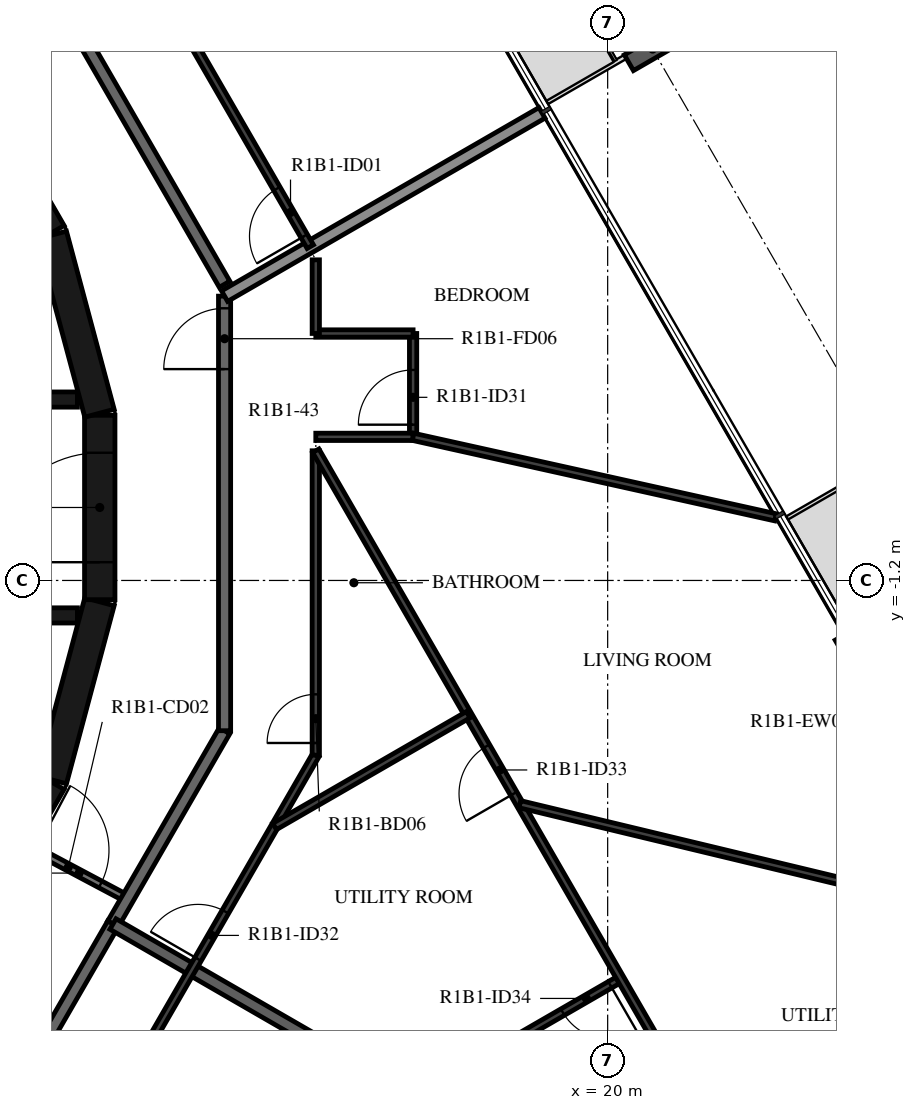
"""IFC4 building model, lengths in metres.
Left out: names, types, materials, properties, quantities, classifications, styles, units other than length and angle.
Written with IfcOpenShell. Run it as: python <this file> out.ifc"""

import sys

from ifc_helpers import new_model, si_unit, direction, frame, frame_2d, origin, origin_2d, place, context, subcontext, project, spatial, rectangle, i_section, extrude, element, fill, save


model = new_model("IFC4")
c1 = context("Model", 3, precision=1e-05, world=origin(), true_north=direction((0.0, 1.0)))
c2 = subcontext(c1, "Body", "Model", "MODEL_VIEW")
j1 = project(units=[si_unit("LENGTHUNIT", "METRE"), si_unit("PLANEANGLEUNIT", "RADIAN")], contexts=[c1])
p1 = place(None, origin())
s1 = spatial("IfcSite", under=j1, at=p1, CompositionType="ELEMENT")
p2 = place(p1, origin())
s2 = spatial("IfcBuilding", under=s1, at=p2, CompositionType="ELEMENT")
p3 = place(p2, frame((0.0, 0.0, 48.9)))
s3 = spatial("IfcBuildingStorey", under=s2, at=p3, CompositionType="ELEMENT", Elevation=48.9)
p4 = place(p3, frame((20.739, 7.539, -0.38), z_axis=(0.0, 0.0, 1.0), x_axis=(0.50000017485, -0.866025302835, 0.0)))
e1 = element("IfcColumn", 1, at=p4, inside=s3, PredefinedType="COLUMN", context=c2, shape_type="SweptSolid", body=[
    extrude(i_section(OverallWidth=0.3, OverallDepth=0.9, WebThickness=0.019, FlangeThickness=0.035, FilletRadius=0.03, at=origin_2d()), origin(), (0.0, 0.0, 1.0), 3.5),
])
p5 = place(p3, frame((25.411, -4.913, 0.0), z_axis=(0.0, 0.0, 1.0), x_axis=(-0.500028443584, 0.866008981251, 0.0)))
e2 = element("IfcWall", 2, at=p5, inside=s3, PredefinedType="STANDARD", context=c2, shape_type="SweptSolid", body=[
    extrude(rectangle(XDim=3.2, YDim=0.16, at=frame_2d((1.6, 0.0))), origin(), (0.0, 0.0, 1.0), 3.12),
])
p6 = place(p5, frame((0.4, 0.0, 0.0)))
e3 = element("IfcOpeningElement", 3, at=p6, cuts=e2, PredefinedType="OPENING", context=c2, shape_type="SweptSolid", body=[
    extrude(rectangle(XDim=2.4, YDim=2.4, at=frame_2d((1.2, 1.2))), frame((0.0, 0.09, 0.0), z_axis=(0.0, -1.0, 0.0), x_axis=(1.0, 0.0, 0.0)), (0.0, 0.0, 1.0), 0.18),
])
for number, where, z_axis, x_axis in (
    (4, (9.329, -7.137, 0.0), (0.0, 0.0, 1.0), (0.5, 0.866, 0.0)),
    (5, (10.858, -4.479, 0.0), (0.0, 0.0, 1.0), (0.259, 0.966, 0.0)),
):
    element("IfcWall", number, at=place(p3, frame(where, z_axis=z_axis, x_axis=x_axis)), inside=s3, PredefinedType="SHEAR", context=c2, shape_type="SweptSolid", body=[
        extrude(rectangle(XDim=3.033, YDim=0.5, at=frame_2d((1.516, 0.0))), origin(), (0.0, 0.0, 1.0), 3.12),
    ])
p7 = place(p3, frame((11.647, -1.516, 0.0), z_axis=(0.0, 0.0, 1.0), x_axis=(0.0, 1.0, 0.0)))
e6 = element("IfcWall", 6, at=p7, inside=s3, PredefinedType="SHEAR", context=c2, shape_type="SweptSolid", body=[
    extrude(rectangle(XDim=3.033, YDim=0.5, at=frame_2d((1.516, 0.0))), origin(), (0.0, 0.0, 1.0), 3.12),
])
p8 = place(p7, frame((0.616, 0.0, 0.0)))
e7 = element("IfcOpeningElement", 7, at=p8, cuts=e6, PredefinedType="OPENING", context=c2, shape_type="SweptSolid", body=[
    extrude(rectangle(XDim=1.8, YDim=2.1, at=frame_2d((0.9, 1.05))), frame((0.0, 0.26, 0.0), z_axis=(0.0, -1.0, 0.0), x_axis=(1.0, 0.0, 0.0)), (0.0, 0.0, 1.0), 0.52),
])
for number, where, z_axis, x_axis in (
    (8, (11.643, 1.55, 0.0), (0.0, 0.0, 1.0), (-0.259, 0.966, 0.0)),
    (9, (10.845, 4.51, 0.0), (0.0, 0.0, 1.0), (-0.5, 0.866, 0.0)),
):
    element("IfcWall", number, at=place(p3, frame(where, z_axis=z_axis, x_axis=x_axis)), inside=s3, PredefinedType="SHEAR", context=c2, shape_type="SweptSolid", body=[
        extrude(rectangle(XDim=3.033, YDim=0.5, at=frame_2d((1.516, 0.0))), origin(), (0.0, 0.0, 1.0), 3.12),
    ])
p9 = place(p3, frame((3.35, 1.775, 0.0), z_axis=(0.0, 0.0, 1.0), x_axis=(1.0, 0.0, 0.0)))
e10 = element("IfcWall", 10, at=p9, inside=s3, PredefinedType="SHEAR", context=c2, shape_type="SweptSolid", body=[
    extrude(rectangle(XDim=7.93, YDim=0.25, at=frame_2d((3.965, 0.0))), origin(), (0.0, 0.0, 1.0), 3.12),
])
p10 = place(p9, frame((0.35, 0.0, 0.0)))
e11 = element("IfcOpeningElement", 11, at=p10, cuts=e10, PredefinedType="OPENING", context=c2, shape_type="SweptSolid", body=[
    extrude(rectangle(XDim=1.2, YDim=2.4, at=frame_2d((0.6, 1.2))), frame((0.0, 0.135, 0.0), z_axis=(0.0, -1.0, 0.0), x_axis=(1.0, 0.0, 0.0)), (0.0, 0.0, 1.0), 0.27),
])
p11 = place(p9, frame((2.5, 0.0, 0.0)))
e12 = element("IfcOpeningElement", 12, at=p11, cuts=e10, PredefinedType="OPENING", context=c2, shape_type="SweptSolid", body=[
    extrude(rectangle(XDim=1.2, YDim=2.4, at=frame_2d((0.6, 1.2))), frame((0.0, 0.135, 0.0), z_axis=(0.0, -1.0, 0.0), x_axis=(1.0, 0.0, 0.0)), (0.0, 0.0, 1.0), 0.27),
])
p12 = place(p9, frame((4.8, 0.0, 0.0)))
e13 = element("IfcOpeningElement", 13, at=p12, cuts=e10, PredefinedType="OPENING", context=c2, shape_type="SweptSolid", body=[
    extrude(rectangle(XDim=0.9, YDim=2.1, at=frame_2d((0.45, 1.05))), frame((0.0, 0.135, 0.0), z_axis=(0.0, -1.0, 0.0), x_axis=(1.0, 0.0, 0.0)), (0.0, 0.0, 1.0), 0.27),
])
p13 = place(p3, frame((3.35, -1.775, 0.0), z_axis=(0.0, 0.0, 1.0), x_axis=(1.0, 0.0, 0.0)))
e14 = element("IfcWall", 14, at=p13, inside=s3, PredefinedType="SHEAR", context=c2, shape_type="SweptSolid", body=[
    extrude(rectangle(XDim=7.93, YDim=0.25, at=frame_2d((3.965, 0.0))), origin(), (0.0, 0.0, 1.0), 3.12),
])
p14 = place(p13, frame((0.4, 0.0, 0.0)))
e15 = element("IfcOpeningElement", 15, at=p14, cuts=e14, PredefinedType="OPENING", context=c2, shape_type="SweptSolid", body=[
    extrude(rectangle(XDim=1.1, YDim=2.4, at=frame_2d((0.55, 1.2))), frame((0.0, 0.135, 0.0), z_axis=(0.0, -1.0, 0.0), x_axis=(1.0, 0.0, 0.0)), (0.0, 0.0, 1.0), 0.27),
])
p15 = place(p13, frame((2.55, 0.0, 0.0)))
e16 = element("IfcOpeningElement", 16, at=p15, cuts=e14, PredefinedType="OPENING", context=c2, shape_type="SweptSolid", body=[
    extrude(rectangle(XDim=1.1, YDim=2.4, at=frame_2d((0.55, 1.2))), frame((0.0, 0.135, 0.0), z_axis=(0.0, -1.0, 0.0), x_axis=(1.0, 0.0, 0.0)), (0.0, 0.0, 1.0), 0.27),
])
p16 = place(p13, frame((4.7, 0.0, 0.0)))
e17 = element("IfcOpeningElement", 17, at=p16, cuts=e14, PredefinedType="OPENING", context=c2, shape_type="SweptSolid", body=[
    extrude(rectangle(XDim=1.1, YDim=2.4, at=frame_2d((0.55, 1.2))), frame((0.0, 0.135, 0.0), z_axis=(0.0, -1.0, 0.0), x_axis=(1.0, 0.0, 0.0)), (0.0, 0.0, 1.0), 0.27),
])
p17 = place(p3, frame((10.511, -5.589, 0.0), z_axis=(0.0, 0.0, 1.0), x_axis=(0.88294043061, -0.469485032769, 0.0)))
e18 = element("IfcWall", 18, at=p17, inside=s3, PredefinedType="PARTITIONING", context=c2, shape_type="SweptSolid", body=[
    extrude(rectangle(XDim=1.804, YDim=0.12, at=frame_2d((0.902, 0.0))), origin(), (0.0, 0.0, 1.0), 3.12),
])
p18 = place(p17, frame((0.1, 0.0, 0.0)))
e19 = element("IfcOpeningElement", 19, at=p18, cuts=e18, PredefinedType="OPENING", context=c2, shape_type="SweptSolid", body=[
    extrude(rectangle(XDim=1.2, YDim=2.1, at=frame_2d((0.6, 1.05))), frame((0.0, 0.07, 0.0), z_axis=(0.0, -1.0, 0.0), x_axis=(1.0, 0.0, 0.0)), (0.0, 0.0, 1.0), 0.14),
])
p19 = place(p3, frame((13.7, 3.671, 0.0), z_axis=(0.0, 0.0, 1.0), x_axis=(-0.500001669485, 0.866024439905, 0.0)))
e20 = element("IfcWall", 20, at=p19, inside=s3, PredefinedType="STANDARD", context=c2, shape_type="SweptSolid", body=[
    extrude(rectangle(XDim=7.342, YDim=0.2, at=frame_2d((3.671, 0.0))), origin(), (0.0, 0.0, 1.0), 3.12),
])
p20 = place(p19, frame((6.142, 0.0, 0.0)))
e21 = element("IfcOpeningElement", 21, at=p20, cuts=e20, PredefinedType="OPENING", context=c2, shape_type="SweptSolid", body=[
    extrude(rectangle(XDim=1.0, YDim=2.1, at=frame_2d((0.5, 1.05))), frame((0.0, 0.11, 0.0), z_axis=(0.0, -1.0, 0.0), x_axis=(1.0, 0.0, 0.0)), (0.0, 0.0, 1.0), 0.22),
])
p21 = place(p3, frame((11.865, -6.85, 0.0), z_axis=(0.0, 0.0, 1.0), x_axis=(0.499987270552, 0.86603275301, 0.0)))
e22 = element("IfcWall", 22, at=p21, inside=s3, PredefinedType="STANDARD", context=c2, shape_type="SweptSolid", body=[
    extrude(rectangle(XDim=3.671, YDim=0.2, at=frame_2d((1.835, 0.0))), origin(), (0.0, 0.0, 1.0), 3.12),
])
p22 = place(p3, frame((13.7, -3.671, 0.0), z_axis=(0.0, 0.0, 1.0), x_axis=(0.0, 1.0, 0.0)))
e23 = element("IfcWall", 23, at=p22, inside=s3, PredefinedType="STANDARD", context=c2, shape_type="SweptSolid", body=[
    extrude(rectangle(XDim=7.146, YDim=0.2, at=frame_2d((3.573, 0.0))), origin(), (0.0, 0.0, 1.0), 3.12),
])
p23 = place(p22, frame((5.947, 0.0, 0.0)))
e24 = element("IfcOpeningElement", 24, at=p23, cuts=e23, PredefinedType="OPENING", context=c2, shape_type="SweptSolid", body=[
    extrude(rectangle(XDim=1.0, YDim=2.1, at=frame_2d((0.5, 1.05))), frame((0.0, 0.11, 0.0), z_axis=(0.0, -1.0, 0.0), x_axis=(1.0, 0.0, 0.0)), (0.0, 0.0, 1.0), 0.22),
])
p24 = place(p3, frame((10.029, -10.029, 0.0), z_axis=(0.0, 0.0, 1.0), x_axis=(0.50001606911, 0.866016126081, 0.0)))
e25 = element("IfcWall", 25, at=p24, inside=s3, PredefinedType="STANDARD", context=c2, shape_type="SweptSolid", body=[
    extrude(rectangle(XDim=3.671, YDim=0.2, at=frame_2d((1.835, 0.0))), origin(), (0.0, 0.0, 1.0), 3.12),
])
p25 = place(p3, frame((13.7, 3.476, 0.0), z_axis=(0.0, 0.0, 1.0), x_axis=(0.866013584312, 0.500020471368, 0.0)))
e26 = element("IfcWall", 26, at=p25, inside=s3, PredefinedType="STANDARD", context=c2, shape_type="SweptSolid", body=[
    extrude(rectangle(XDim=6.028, YDim=0.2, at=frame_2d((3.014, 0.0))), origin(), (0.0, 0.0, 1.0), 2.73),
])
p26 = place(p3, frame((16.817, -9.709, 0.0), z_axis=(0.0, 0.0, 1.0), x_axis=(-0.86604338933, 0.499968846828, 0.0)))
e27 = element("IfcWall", 27, at=p26, inside=s3, PredefinedType="STANDARD", context=c2, shape_type="SweptSolid", body=[
    extrude(rectangle(XDim=5.718, YDim=0.2, at=frame_2d((2.859, 0.0))), origin(), (0.0, 0.0, 1.0), 3.12),
])
p27 = place(p3, frame((15.11, 4.289, 0.0), z_axis=(0.0, 0.0, 1.0), x_axis=(-0.500033654285, 0.866005972602, 0.0)))
e28 = element("IfcWall", 28, at=p27, inside=s3, PredefinedType="PARTITIONING", context=c2, shape_type="SweptSolid", body=[
    extrude(rectangle(XDim=5.003, YDim=0.12, at=frame_2d((2.501, 0.0))), origin(), (0.0, 0.0, 1.0), 3.12),
])
p28 = place(p27, frame((0.2, 0.0, 0.0)))
e29 = element("IfcOpeningElement", 29, at=p28, cuts=e28, PredefinedType="OPENING", context=c2, shape_type="SweptSolid", body=[
    extrude(rectangle(XDim=0.9, YDim=2.1, at=frame_2d((0.45, 1.05))), frame((0.0, 0.07, 0.0), z_axis=(0.0, -1.0, 0.0), x_axis=(1.0, 0.0, 0.0)), (0.0, 0.0, 1.0), 0.14),
])
p29 = place(p3, frame((11.127, -11.127, 0.0), z_axis=(0.0, 0.0, 1.0), x_axis=(0.499987950692, 0.866032360344, 0.0)))
e30 = element("IfcWall", 30, at=p29, inside=s3, PredefinedType="PARTITIONING", context=c2, shape_type="SweptSolid", body=[
    extrude(rectangle(XDim=8.146, YDim=0.12, at=frame_2d((4.073, 0.0))), origin(), (0.0, 0.0, 1.0), 3.12),
])
p30 = place(p29, frame((1.303, 0.0, 0.0)))
e31 = element("IfcOpeningElement", 31, at=p30, cuts=e30, PredefinedType="OPENING", context=c2, shape_type="SweptSolid", body=[
    extrude(rectangle(XDim=0.9, YDim=2.1, at=frame_2d((0.45, 1.05))), frame((0.0, 0.07, 0.0), z_axis=(0.0, -1.0, 0.0), x_axis=(1.0, 0.0, 0.0)), (0.0, 0.0, 1.0), 0.14),
])
p31 = place(p29, frame((4.273, 0.0, 0.0)))
e32 = element("IfcOpeningElement", 32, at=p31, cuts=e30, PredefinedType="OPENING", context=c2, shape_type="SweptSolid", body=[
    extrude(rectangle(XDim=0.9, YDim=2.1, at=frame_2d((0.45, 1.05))), frame((0.0, 0.07, 0.0), z_axis=(0.0, -1.0, 0.0), x_axis=(1.0, 0.0, 0.0)), (0.0, 0.0, 1.0), 0.14),
])
p32 = place(p3, frame((16.8, 1.162, 0.0), z_axis=(0.0, 0.0, 1.0), x_axis=(0.0, 1.0, 0.0)))
e33 = element("IfcWall", 33, at=p32, inside=s3, PredefinedType="PARTITIONING", context=c2, shape_type="SweptSolid", body=[
    extrude(rectangle(XDim=1.7, YDim=0.12, at=frame_2d((0.85, 0.0))), origin(), (0.0, 0.0, 1.0), 3.12),
])
p33 = place(p32, frame((0.2, 0.0, 0.0)))
e34 = element("IfcOpeningElement", 34, at=p33, cuts=e33, PredefinedType="OPENING", context=c2, shape_type="SweptSolid", body=[
    extrude(rectangle(XDim=0.9, YDim=2.1, at=frame_2d((0.45, 1.05))), frame((0.0, 0.07, 0.0), z_axis=(0.0, -1.0, 0.0), x_axis=(1.0, 0.0, 0.0)), (0.0, 0.0, 1.0), 0.14),
])
p34 = place(p3, frame((16.8, 2.862, 0.0), z_axis=(0.0, 0.0, 1.0), x_axis=(-1.0, 0.0, 0.0)))
e35 = element("IfcWall", 35, at=p34, inside=s3, PredefinedType="PARTITIONING", context=c2, shape_type="SweptSolid", body=[
    extrude(rectangle(XDim=1.6, YDim=0.12, at=frame_2d((0.8, 0.0))), origin(), (0.0, 0.0, 1.0), 3.12),
])
p35 = place(p3, frame((15.2, 2.862, 0.0), z_axis=(0.0, 0.0, 1.0), x_axis=(0.0, 1.0, 0.0)))
e36 = element("IfcWall", 36, at=p35, inside=s3, PredefinedType="PARTITIONING", context=c2, shape_type="SweptSolid", body=[
    extrude(rectangle(XDim=1.211, YDim=0.12, at=frame_2d((0.605, 0.0))), origin(), (0.0, 0.0, 1.0), 3.12),
])
p36 = place(p3, frame((15.2, -4.073, 0.0), z_axis=(0.0, 0.0, 1.0), x_axis=(0.0, 1.0, 0.0)))
e37 = element("IfcWall", 37, at=p36, inside=s3, PredefinedType="PARTITIONING", context=c2, shape_type="SweptSolid", body=[
    extrude(rectangle(XDim=5.005, YDim=0.12, at=frame_2d((2.503, 0.0))), origin(), (0.0, 0.0, 1.0), 3.12),
])
p37 = place(p36, frame((0.2, 0.0, 0.0)))
e38 = element("IfcOpeningElement", 38, at=p37, cuts=e37, PredefinedType="OPENING", context=c2, shape_type="SweptSolid", body=[
    extrude(rectangle(XDim=0.8, YDim=2.1, at=frame_2d((0.4, 1.05))), frame((0.0, 0.07, 0.0), z_axis=(0.0, -1.0, 0.0), x_axis=(1.0, 0.0, 0.0)), (0.0, 0.0, 1.0), 0.14),
])
p38 = place(p3, frame((15.2, 1.162, 0.0), z_axis=(0.0, 0.0, 1.0), x_axis=(1.0, 0.0, 0.0)))
e39 = element("IfcWall", 39, at=p38, inside=s3, PredefinedType="PARTITIONING", context=c2, shape_type="SweptSolid", body=[
    extrude(rectangle(XDim=1.6, YDim=0.12, at=frame_2d((0.8, 0.0))), origin(), (0.0, 0.0, 1.0), 3.12),
])
p39 = place(p3, frame((16.8, 1.162, 0.0), z_axis=(0.0, 0.0, 1.0), x_axis=(0.976218101949, -0.216790722652, 0.0)))
e40 = element("IfcWall", 40, at=p39, inside=s3, PredefinedType="PARTITIONING", context=c2, shape_type="SweptSolid", body=[
    extrude(rectangle(XDim=6.105, YDim=0.12, at=frame_2d((3.052, 0.0))), origin(), (0.0, 0.0, 1.0), 3.12),
])
p40 = place(p3, frame((20.212, -7.749, 0.0), z_axis=(0.0, 0.0, 1.0), x_axis=(-0.86604663799, -0.499963219473, 0.0)))
e41 = element("IfcWall", 41, at=p40, inside=s3, PredefinedType="PARTITIONING", context=c2, shape_type="SweptSolid", body=[
    extrude(rectangle(XDim=3.921, YDim=0.12, at=frame_2d((1.96, 0.0))), origin(), (0.0, 0.0, 1.0), 3.12),
])
p41 = place(p40, frame((0.2, 0.0, 0.0)))
e42 = element("IfcOpeningElement", 42, at=p41, cuts=e41, PredefinedType="OPENING", context=c2, shape_type="SweptSolid", body=[
    extrude(rectangle(XDim=0.9, YDim=2.1, at=frame_2d((0.45, 1.05))), frame((0.0, 0.07, 0.0), z_axis=(0.0, -1.0, 0.0), x_axis=(1.0, 0.0, 0.0)), (0.0, 0.0, 1.0), 0.14),
])
p42 = place(p3, frame((21.701, -10.327, 0.0), z_axis=(0.0, 0.0, 1.0), x_axis=(-0.500008528526, 0.866020479782, 0.0)))
e43 = element("IfcWall", 43, at=p42, inside=s3, PredefinedType="PARTITIONING", context=c2, shape_type="SweptSolid", body=[
    extrude(rectangle(XDim=13.002, YDim=0.12, at=frame_2d((6.501, 0.0))), origin(), (0.0, 0.0, 1.0), 3.12),
])
p43 = place(p42, frame((6.49, 0.0, 0.0)))
e44 = element("IfcOpeningElement", 44, at=p43, cuts=e43, PredefinedType="OPENING", context=c2, shape_type="SweptSolid", body=[
    extrude(rectangle(XDim=0.9, YDim=2.1, at=frame_2d((0.45, 1.05))), frame((0.0, 0.07, 0.0), z_axis=(0.0, -1.0, 0.0), x_axis=(1.0, 0.0, 0.0)), (0.0, 0.0, 1.0), 0.14),
])
p44 = place(p42, frame((1.0, 0.0, 0.0)))
e45 = element("IfcOpeningElement", 45, at=p44, cuts=e43, PredefinedType="OPENING", context=c2, shape_type="SweptSolid", body=[
    extrude(rectangle(XDim=0.9, YDim=2.1, at=frame_2d((0.45, 1.05))), frame((0.0, 0.07, 0.0), z_axis=(0.0, -1.0, 0.0), x_axis=(1.0, 0.0, 0.0)), (0.0, 0.0, 1.0), 0.14),
])
p45 = place(p3, frame((17.706, -3.408, 0.0), z_axis=(0.0, 0.0, 1.0), x_axis=(-0.866027421574, -0.49999650507, 0.0)))
e46 = element("IfcWall", 46, at=p45, inside=s3, PredefinedType="PARTITIONING", context=c2, shape_type="SweptSolid", body=[
    extrude(rectangle(XDim=3.676, YDim=0.12, at=frame_2d((1.838, 0.0))), origin(), (0.0, 0.0, 1.0), 3.12),
])
p46 = place(p3, frame((26.6, -6.813, 0.0), z_axis=(0.0, 0.0, 1.0), x_axis=(-0.972306888212, 0.233707755831, 0.0)))
e47 = element("IfcWall", 47, at=p46, inside=s3, PredefinedType="PARTITIONING", context=c2, shape_type="SweptSolid", body=[
    extrude(rectangle(XDim=8.273, YDim=0.12, at=frame_2d((4.137, 0.0))), origin(), (0.0, 0.0, 1.0), 3.12),
])
p47 = place(p8, origin())
e48 = element("IfcDoor", 48, at=p47, inside=s3, OperationType="DOUBLE_DOOR_SINGLE_SWING", PredefinedType="DOOR", context=c2, shape_type="SweptSolid", body=[
    extrude(rectangle(XDim=1.8, YDim=2.1, at=frame_2d((0.9, 1.05))), frame((0.0, 0.025, 0.0), z_axis=(0.0, -1.0, 0.0), x_axis=(1.0, 0.0, 0.0)), (0.0, 0.0, 1.0), 0.05),
])
fill(e7, e48)
p48 = place(p28, origin())
e49 = element("IfcDoor", 49, at=p48, inside=s3, OperationType="SINGLE_SWING_LEFT", PredefinedType="DOOR", context=c2, shape_type="SweptSolid", body=[
    extrude(rectangle(XDim=0.9, YDim=2.1, at=frame_2d((0.45, 1.05))), frame((0.0, 0.025, 0.0), z_axis=(0.0, -1.0, 0.0), x_axis=(1.0, 0.0, 0.0)), (0.0, 0.0, 1.0), 0.05),
])
fill(e29, e49)
p49 = place(p23, origin())
e50 = element("IfcDoor", 50, at=p49, inside=s3, OperationType="SINGLE_SWING_LEFT", PredefinedType="DOOR", context=c2, shape_type="SweptSolid", body=[
    extrude(rectangle(XDim=1.0, YDim=2.1, at=frame_2d((0.5, 1.05))), frame((0.0, 0.025, 0.0), z_axis=(0.0, -1.0, 0.0), x_axis=(1.0, 0.0, 0.0)), (0.0, 0.0, 1.0), 0.05),
])
fill(e24, e50)
p50 = place(p33, origin())
e51 = element("IfcDoor", 51, at=p50, inside=s3, OperationType="SINGLE_SWING_LEFT", PredefinedType="DOOR", context=c2, shape_type="SweptSolid", body=[
    extrude(rectangle(XDim=0.9, YDim=2.1, at=frame_2d((0.45, 1.05))), frame((0.0, 0.025, 0.0), z_axis=(0.0, -1.0, 0.0), x_axis=(1.0, 0.0, 0.0)), (0.0, 0.0, 1.0), 0.05),
])
fill(e34, e51)
p51 = place(p31, origin())
e52 = element("IfcDoor", 52, at=p51, inside=s3, OperationType="SINGLE_SWING_LEFT", PredefinedType="DOOR", context=c2, shape_type="SweptSolid", body=[
    extrude(rectangle(XDim=0.9, YDim=2.1, at=frame_2d((0.45, 1.05))), frame((0.0, 0.025, 0.0), z_axis=(0.0, -1.0, 0.0), x_axis=(1.0, 0.0, 0.0)), (0.0, 0.0, 1.0), 0.05),
])
fill(e32, e52)
p52 = place(p37, origin())
e53 = element("IfcDoor", 53, at=p52, inside=s3, OperationType="SINGLE_SWING_LEFT", PredefinedType="DOOR", context=c2, shape_type="SweptSolid", body=[
    extrude(rectangle(XDim=0.8, YDim=2.1, at=frame_2d((0.4, 1.05))), frame((0.0, 0.025, 0.0), z_axis=(0.0, -1.0, 0.0), x_axis=(1.0, 0.0, 0.0)), (0.0, 0.0, 1.0), 0.05),
])
fill(e38, e53)
p53 = place(p43, origin())
e54 = element("IfcDoor", 54, at=p53, inside=s3, OperationType="SINGLE_SWING_LEFT", PredefinedType="DOOR", context=c2, shape_type="SweptSolid", body=[
    extrude(rectangle(XDim=0.9, YDim=2.1, at=frame_2d((0.45, 1.05))), frame((0.0, 0.025, 0.0), z_axis=(0.0, -1.0, 0.0), x_axis=(1.0, 0.0, 0.0)), (0.0, 0.0, 1.0), 0.05),
])
fill(e44, e54)
p54 = place(p41, origin())
e55 = element("IfcDoor", 55, at=p54, inside=s3, OperationType="SINGLE_SWING_LEFT", PredefinedType="DOOR", context=c2, shape_type="SweptSolid", body=[
    extrude(rectangle(XDim=0.9, YDim=2.1, at=frame_2d((0.45, 1.05))), frame((0.0, 0.025, 0.0), z_axis=(0.0, -1.0, 0.0), x_axis=(1.0, 0.0, 0.0)), (0.0, 0.0, 1.0), 0.05),
])
fill(e42, e55)
p55 = place(p18, origin())
e56 = element("IfcDoor", 56, at=p55, inside=s3, OperationType="DOUBLE_DOOR_SINGLE_SWING", PredefinedType="DOOR", context=c2, shape_type="SweptSolid", body=[
    extrude(rectangle(XDim=1.2, YDim=2.1, at=frame_2d((0.6, 1.05))), frame((0.0, 0.025, 0.0), z_axis=(0.0, -1.0, 0.0), x_axis=(1.0, 0.0, 0.0)), (0.0, 0.0, 1.0), 0.05),
])
fill(e19, e56)
save(model, sys.argv[1])
